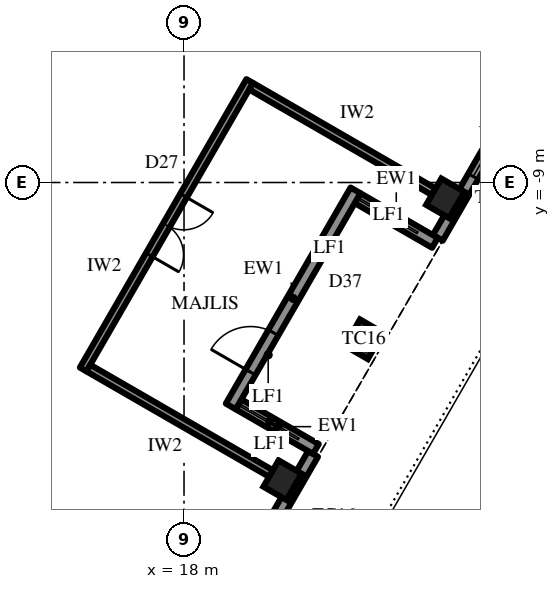
"""IFC4 building model, lengths in metres.
Left out: names, types, materials, properties, quantities, classifications, styles, units other than length and angle.
Written with IfcOpenShell. Run it as: python <this file> out.ifc"""

import sys

from ifc_helpers import new_model, si_unit, direction, frame, frame_2d, origin, origin_2d, place, context, subcontext, project, spatial, rectangle, extrude, element, fill, save


model = new_model("IFC4")
c1 = context("Model", 3, precision=1e-05, world=origin(), true_north=direction((0.0, 1.0)))
c2 = subcontext(c1, "Body", "Model", "MODEL_VIEW")
j1 = project(units=[si_unit("LENGTHUNIT", "METRE"), si_unit("PLANEANGLEUNIT", "RADIAN")], contexts=[c1])
p1 = place(None, origin())
s1 = spatial("IfcSite", under=j1, at=p1, CompositionType="ELEMENT")
p2 = place(p1, origin())
s2 = spatial("IfcBuilding", under=s1, at=p2, CompositionType="ELEMENT")
p3 = place(p2, frame((0.0, 0.0, 374.5)))
s3 = spatial("IfcBuildingStorey", under=s2, at=p3, CompositionType="ELEMENT", Elevation=374.5)
for number, where, z_axis, x_axis in (
    (1, (20.592, -16.833, 0.0), (0.0, 0.0, 1.0), (0.5, 0.866, 0.0)),
    (2, (22.733, -13.125, 0.0), (0.0, 0.0, 1.0), (0.5, 0.866, 0.0)),
    (3, (24.874, -9.417, 0.0), (0.0, 0.0, 1.0), (0.5, 0.866, 0.0)),
):
    element("IfcColumn", number, at=place(p3, frame(where, z_axis=z_axis, x_axis=x_axis)), inside=s3, PredefinedType="COLUMN", context=c2, shape_type="SweptSolid", body=[
        extrude(rectangle(XDim=0.8, YDim=0.7, at=origin_2d()), origin(), (0.0, 0.0, 1.0), 4.2),
    ])
p4 = place(p3, frame((16.613, -24.425, 0.0), z_axis=(0.0, 0.0, 1.0), x_axis=(0.499996453679, 0.866027451244, 0.0)))
e4 = element("IfcWall", 4, at=p4, inside=s3, PredefinedType="SOLIDWALL", context=c2, shape_type="SweptSolid", body=[
    extrude(rectangle(XDim=9.564, YDim=0.3, at=frame_2d((4.782, 0.0))), origin(), (0.0, 0.0, 1.0), 2.9),
])
p5 = place(p4, frame((0.866, 0.0, 0.6)))
e5 = element("IfcOpeningElement", 5, at=p5, cuts=e4, PredefinedType="OPENING", context=c2, shape_type="SweptSolid", body=[
    extrude(rectangle(XDim=2.55, YDim=2.05, at=frame_2d((1.275, 1.025))), frame((0.0, 0.16, 0.0), z_axis=(0.0, -1.0, 0.0), x_axis=(1.0, 0.0, 0.0)), (0.0, 0.0, 1.0), 0.32),
])
p6 = place(p4, frame((5.823, 0.0, 0.0)))
e6 = element("IfcOpeningElement", 6, at=p6, cuts=e4, PredefinedType="OPENING", context=c2, shape_type="SweptSolid", body=[
    extrude(rectangle(XDim=1.2, YDim=2.4, at=frame_2d((0.6, 1.2))), frame((0.0, 0.16, 0.0), z_axis=(0.0, -1.0, 0.0), x_axis=(1.0, 0.0, 0.0)), (0.0, 0.0, 1.0), 0.32),
])
p7 = place(p3, frame((24.677, -10.458, 0.0), z_axis=(0.0, 0.0, 1.0), x_axis=(0.499996453679, 0.866027451244, 0.0)))
e7 = element("IfcWall", 7, at=p7, inside=s3, PredefinedType="SOLIDWALL", context=c2, shape_type="SweptSolid", body=[
    extrude(rectangle(XDim=9.564, YDim=0.3, at=frame_2d((4.782, 0.0))), origin(), (0.0, 0.0, 1.0), 2.9),
])
p8 = place(p7, frame((1.866, 0.0, 0.6)))
e8 = element("IfcOpeningElement", 8, at=p8, cuts=e7, PredefinedType="OPENING", context=c2, shape_type="SweptSolid", body=[
    extrude(rectangle(XDim=2.55, YDim=2.05, at=frame_2d((1.275, 1.025))), frame((0.0, 0.16, 0.0), z_axis=(0.0, -1.0, 0.0), x_axis=(1.0, 0.0, 0.0)), (0.0, 0.0, 1.0), 0.32),
])
p9 = place(p7, frame((6.148, 0.0, 0.6)))
e9 = element("IfcOpeningElement", 9, at=p9, cuts=e7, PredefinedType="OPENING", context=c2, shape_type="SweptSolid", body=[
    extrude(rectangle(XDim=2.55, YDim=2.05, at=frame_2d((1.275, 1.025))), frame((0.0, 0.16, 0.0), z_axis=(0.0, -1.0, 0.0), x_axis=(1.0, 0.0, 0.0)), (0.0, 0.0, 1.0), 0.32),
])
for number, where, z_axis, x_axis in (
    (10, (21.47, -16.012, 0.0), (0.0, 0.0, 1.0), (-0.866, 0.5, 0.0)),
    (11, (24.602, -10.588, 0.0), (0.0, 0.0, 1.0), (-0.866, 0.5, 0.0)),
):
    element("IfcWall", number, at=place(p3, frame(where, z_axis=z_axis, x_axis=x_axis)), inside=s3, PredefinedType="SOLIDWALL", context=c2, shape_type="SweptSolid", body=[
        extrude(rectangle(XDim=2.35, YDim=0.3, at=frame_2d((1.175, 0.0))), origin(), (0.0, 0.0, 1.0), 2.9),
    ])
p10 = place(p3, frame((19.23, -14.892, 0.0), z_axis=(0.0, 0.0, 1.0), x_axis=(0.499999339774, 0.866025784966, 0.0)))
e12 = element("IfcWall", 12, at=p10, inside=s3, PredefinedType="SOLIDWALL", context=c2, shape_type="SweptSolid", body=[
    extrude(rectangle(XDim=6.564, YDim=0.3, at=frame_2d((3.282, 0.0))), origin(), (0.0, 0.0, 1.0), 2.9),
])
p11 = place(p10, frame((1.041, 0.0, 0.0)))
e13 = element("IfcOpeningElement", 13, at=p11, cuts=e12, PredefinedType="OPENING", context=c2, shape_type="SweptSolid", body=[
    extrude(rectangle(XDim=1.2, YDim=2.4, at=frame_2d((0.6, 1.2))), frame((0.0, 0.16, 0.0), z_axis=(0.0, -1.0, 0.0), x_axis=(1.0, 0.0, 0.0)), (0.0, 0.0, 1.0), 0.32),
])
p12 = place(p3, frame((15.346, -13.92, 0.0), z_axis=(0.0, 0.0, 1.0), x_axis=(0.500006995557, 0.86602136486, 0.0)))
e14 = element("IfcWall", 14, at=p12, inside=s3, PredefinedType="PARTITIONING", context=c2, shape_type="SweptSolid", body=[
    extrude(rectangle(XDim=8.764, YDim=0.2, at=frame_2d((4.382, 0.0))), origin(), (0.0, 0.0, 1.0), 4.0),
])
p13 = place(p12, frame((3.482, 0.0, 0.0)))
e15 = element("IfcOpeningElement", 15, at=p13, cuts=e14, PredefinedType="OPENING", context=c2, shape_type="SweptSolid", body=[
    extrude(rectangle(XDim=1.8, YDim=2.4, at=frame_2d((0.9, 1.2))), frame((0.0, 0.11, 0.0), z_axis=(0.0, -1.0, 0.0), x_axis=(1.0, 0.0, 0.0)), (0.0, 0.0, 1.0), 0.22),
])
p14 = place(p3, frame((15.483, -13.883, 0.0), z_axis=(0.0, 0.0, 1.0), x_axis=(0.866011969997, -0.500023267281, 0.0)))
e16 = element("IfcWall", 16, at=p14, inside=s3, PredefinedType="PARTITIONING", context=c2, shape_type="SweptSolid", body=[
    extrude(rectangle(XDim=5.55, YDim=0.2, at=frame_2d((2.775, 0.0))), origin(), (0.0, 0.0, 1.0), 3.082),
])
p15 = place(p3, frame((19.765, -6.467, 0.0), z_axis=(0.0, 0.0, 1.0), x_axis=(0.866011969997, -0.500023267281, 0.0)))
e17 = element("IfcWall", 17, at=p15, inside=s3, PredefinedType="PARTITIONING", context=c2, shape_type="SweptSolid", body=[
    extrude(rectangle(XDim=5.55, YDim=0.2, at=frame_2d((2.775, 0.0))), origin(), (0.0, 0.0, 1.0), 2.992),
])
p16 = place(p8, origin())
e18 = element("IfcWindow", 18, at=p16, inside=s3, PartitioningType="SINGLE_PANEL", PredefinedType="WINDOW", context=c2, shape_type="SweptSolid", body=[
    extrude(rectangle(XDim=2.55, YDim=2.05, at=frame_2d((1.275, 1.025))), frame((0.0, 0.03, 0.0), z_axis=(0.0, -1.0, 0.0), x_axis=(1.0, 0.0, 0.0)), (0.0, 0.0, 1.0), 0.06),
])
fill(e8, e18)
p17 = place(p11, origin())
e19 = element("IfcDoor", 19, at=p17, inside=s3, OperationType="SINGLE_SWING_RIGHT", PredefinedType="DOOR", context=c2, shape_type="SweptSolid", body=[
    extrude(rectangle(XDim=1.2, YDim=2.4, at=frame_2d((0.6, 1.2))), frame((0.0, 0.025, 0.0), z_axis=(0.0, -1.0, 0.0), x_axis=(1.0, 0.0, 0.0)), (0.0, 0.0, 1.0), 0.05),
])
fill(e13, e19)
p18 = place(p13, frame((1.8, 0.0, 0.0), z_axis=(0.0, 0.0, 1.0), x_axis=(-1.0, 0.0, 0.0)))
e20 = element("IfcDoor", 20, at=p18, inside=s3, OperationType="DOUBLE_DOOR_SINGLE_SWING", PredefinedType="DOOR", context=c2, shape_type="SweptSolid", body=[
    extrude(rectangle(XDim=1.8, YDim=2.4, at=frame_2d((0.9, 1.2))), frame((0.0, 0.025, 0.0), z_axis=(0.0, -1.0, 0.0), x_axis=(1.0, 0.0, 0.0)), (0.0, 0.0, 1.0), 0.05),
])
fill(e15, e20)
save(model, sys.argv[1])
